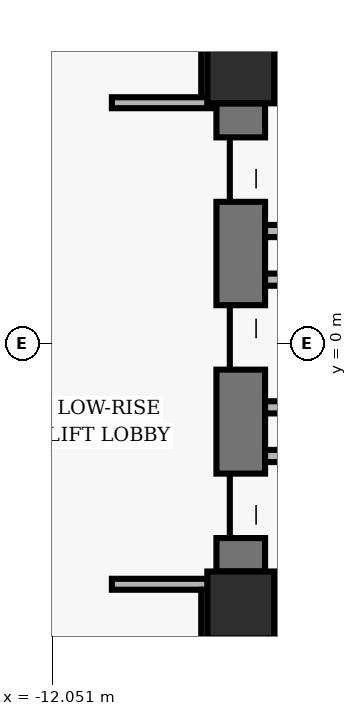
"""IFC4 building model, lengths in metres.
Left out: names, types, materials, properties, quantities, classifications, styles, units other than length and angle.
Written with IfcOpenShell. Run it as: python <this file> out.ifc"""

import sys

from ifc_helpers import new_model, si_unit, direction, frame, frame_2d, origin, origin_2d, place, context, subcontext, project, spatial, rectangle, hollow_rectangle, extrude, element, fill, save


model = new_model("IFC4")
c1 = context("Model", 3, precision=1e-05, world=origin(), true_north=direction((0.0, 1.0)))
c2 = subcontext(c1, "Body", "Model", "MODEL_VIEW")
j1 = project(units=[si_unit("LENGTHUNIT", "METRE"), si_unit("PLANEANGLEUNIT", "RADIAN")], contexts=[c1])
p1 = place(None, origin())
s1 = spatial("IfcSite", under=j1, at=p1, CompositionType="ELEMENT")
p2 = place(p1, origin())
s2 = spatial("IfcBuilding", under=s1, at=p2, CompositionType="ELEMENT")
p3 = place(p2, frame((0.0, 0.0, 8.32)))
s3 = spatial("IfcBuildingStorey", under=s2, at=p3, CompositionType="ELEMENT", Elevation=8.32)
for number, where, z_axis, x_axis in (
    (1, (-8.95, 4.5, 0.0), (0.0, 0.0, 1.0), (1.0, 0.0, 0.0)),
    (2, (-8.95, -4.3, 0.0), (0.0, 0.0, 1.0), (1.0, 0.0, 0.0)),
):
    element("IfcColumn", number, at=place(p3, frame(where, z_axis=z_axis, x_axis=x_axis)), inside=s3, PredefinedType="COLUMN", context=c2, shape_type="SweptSolid", body=[
        extrude(hollow_rectangle(XDim=1.1, YDim=1.1, WallThickness=0.07, InnerFilletRadius=0.02, OuterFilletRadius=0.04, at=origin_2d()), origin(), (0.0, 0.0, 1.0), 3.52),
    ])
p4 = place(p3, frame((-8.95, -3.75, 0.0), z_axis=(0.0, 0.0, 1.0), x_axis=(0.0, 1.0, 0.0)))
e3 = element("IfcWall", 3, at=p4, inside=s3, PredefinedType="SHEAR", context=c2, shape_type="SweptSolid", body=[
    extrude(rectangle(XDim=7.7, YDim=0.8, at=frame_2d((3.85, 0.0))), origin(), (0.0, 0.0, 1.0), 3.218),
])
p5 = place(p4, frame((0.55, 0.0, 0.0)))
e4 = element("IfcOpeningElement", 4, at=p5, cuts=e3, PredefinedType="OPENING", context=c2, shape_type="SweptSolid", body=[
    extrude(rectangle(XDim=1.06, YDim=2.04, at=frame_2d((0.53, 1.02))), frame((0.0, 0.41, 0.0), z_axis=(0.0, -1.0, 0.0), x_axis=(1.0, 0.0, 0.0)), (0.0, 0.0, 1.0), 0.82),
])
p6 = place(p4, frame((3.32, 0.0, 0.0)))
e5 = element("IfcOpeningElement", 5, at=p6, cuts=e3, PredefinedType="OPENING", context=c2, shape_type="SweptSolid", body=[
    extrude(rectangle(XDim=1.06, YDim=2.04, at=frame_2d((0.53, 1.02))), frame((0.0, 0.41, 0.0), z_axis=(0.0, -1.0, 0.0), x_axis=(1.0, 0.0, 0.0)), (0.0, 0.0, 1.0), 0.82),
])
p7 = place(p4, frame((6.08, 0.0, 0.0)))
e6 = element("IfcOpeningElement", 6, at=p7, cuts=e3, PredefinedType="OPENING", context=c2, shape_type="SweptSolid", body=[
    extrude(rectangle(XDim=1.06, YDim=2.04, at=frame_2d((0.53, 1.02))), frame((0.0, 0.41, 0.0), z_axis=(0.0, -1.0, 0.0), x_axis=(1.0, 0.0, 0.0)), (0.0, 0.0, 1.0), 0.82),
])
for number, where, z_axis, x_axis in (
    (7, (-8.4, 4.5, 0.0), (0.0, 0.0, 1.0), (1.0, 0.0, 0.0)),
    (8, (-8.4, -4.3, 0.0), (0.0, 0.0, 1.0), (1.0, 0.0, 0.0)),
):
    element("IfcWall", number, at=place(p3, frame(where, z_axis=z_axis, x_axis=x_axis)), inside=s3, PredefinedType="SHEAR", context=c2, shape_type="SweptSolid", body=[
        extrude(rectangle(XDim=1.8, YDim=0.4, at=frame_2d((0.9, 0.0))), origin(), (0.0, 0.0, 1.0), 3.218),
    ])
for number, where, z_axis, x_axis in (
    (9, (-8.55, -1.85, 0.0), (0.0, 0.0, 1.0), (1.0, 0.0, 0.0)),
    (10, (-8.55, 1.85, 0.0), (0.0, 0.0, 1.0), (1.0, 0.0, 0.0)),
):
    element("IfcWall", number, at=place(p3, frame(where, z_axis=z_axis, x_axis=x_axis)), inside=s3, PredefinedType="PARTITIONING", context=c2, shape_type="SweptSolid", body=[
        extrude(rectangle(XDim=2.1, YDim=0.2, at=frame_2d((1.05, 0.0))), origin(), (0.0, 0.0, 1.0), 3.193),
    ])
for number, where, z_axis, x_axis in (
    (11, (-8.55, -1.05, 0.0), (0.0, 0.0, 1.0), (1.0, 0.0, 0.0)),
    (12, (-8.55, 1.05, 0.0), (0.0, 0.0, 1.0), (1.0, 0.0, 0.0)),
):
    element("IfcWall", number, at=place(p3, frame(where, z_axis=z_axis, x_axis=x_axis)), inside=s3, PredefinedType="PARTITIONING", context=c2, shape_type="SweptSolid", body=[
        extrude(rectangle(XDim=1.91, YDim=0.2, at=frame_2d((0.955, 0.0))), origin(), (0.0, 0.0, 1.0), 3.193),
    ])
p8 = place(p3, frame((-11.07, -3.96, 0.0), z_axis=(0.0, 0.0, 1.0), x_axis=(1.0, 0.0, 0.0)))
e13 = element("IfcWall", 13, at=p8, inside=s3, PredefinedType="PARTITIONING", context=c2, shape_type="SweptSolid", body=[
    extrude(rectangle(XDim=1.65, YDim=0.18, at=frame_2d((0.825, 0.0))), origin(), (0.0, 0.0, 1.0), 2.246),
])
for number, where, z_axis, x_axis in (
    (14, (-9.51, -4.05, 0.0), (0.0, 0.0, 1.0), (0.0, -1.0, 0.0)),
    (15, (-9.51, 4.87, 0.0), (0.0, 0.0, 1.0), (0.0, -1.0, 0.0)),
):
    element("IfcWall", number, at=place(p3, frame(where, z_axis=z_axis, x_axis=x_axis)), inside=s3, PredefinedType="PARTITIONING", context=c2, shape_type="SweptSolid", body=[
        extrude(rectangle(XDim=0.82, YDim=0.18, at=frame_2d((0.41, 0.0))), origin(), (0.0, 0.0, 1.0), 3.193),
    ])
p9 = place(p3, frame((-9.42, 3.96, 0.0), z_axis=(0.0, 0.0, 1.0), x_axis=(-1.0, 0.0, 0.0)))
e16 = element("IfcWall", 16, at=p9, inside=s3, PredefinedType="PARTITIONING", context=c2, shape_type="SweptSolid", body=[
    extrude(rectangle(XDim=1.65, YDim=0.18, at=frame_2d((0.825, 0.0))), origin(), (0.0, 0.0, 1.0), 3.193),
])
p10 = place(p5, origin())
e17 = element("IfcDoor", 17, at=p10, inside=s3, OperationType="SLIDING_TO_LEFT", PredefinedType="DOOR", context=c2, shape_type="SweptSolid", body=[
    extrude(rectangle(XDim=1.06, YDim=2.04, at=frame_2d((0.53, 1.02))), frame((0.0, 0.025, 0.0), z_axis=(0.0, -1.0, 0.0), x_axis=(1.0, 0.0, 0.0)), (0.0, 0.0, 1.0), 0.05),
])
fill(e4, e17)
p11 = place(p6, origin())
e18 = element("IfcDoor", 18, at=p11, inside=s3, OperationType="SLIDING_TO_RIGHT", PredefinedType="DOOR", context=c2, shape_type="SweptSolid", body=[
    extrude(rectangle(XDim=1.06, YDim=2.04, at=frame_2d((0.53, 1.02))), frame((0.0, 0.025, 0.0), z_axis=(0.0, -1.0, 0.0), x_axis=(1.0, 0.0, 0.0)), (0.0, 0.0, 1.0), 0.05),
])
fill(e5, e18)
p12 = place(p7, origin())
e19 = element("IfcDoor", 19, at=p12, inside=s3, OperationType="SLIDING_TO_LEFT", PredefinedType="DOOR", context=c2, shape_type="SweptSolid", body=[
    extrude(rectangle(XDim=1.06, YDim=2.04, at=frame_2d((0.53, 1.02))), frame((0.0, 0.025, 0.0), z_axis=(0.0, -1.0, 0.0), x_axis=(1.0, 0.0, 0.0)), (0.0, 0.0, 1.0), 0.05),
])
fill(e6, e19)
save(model, sys.argv[1])
